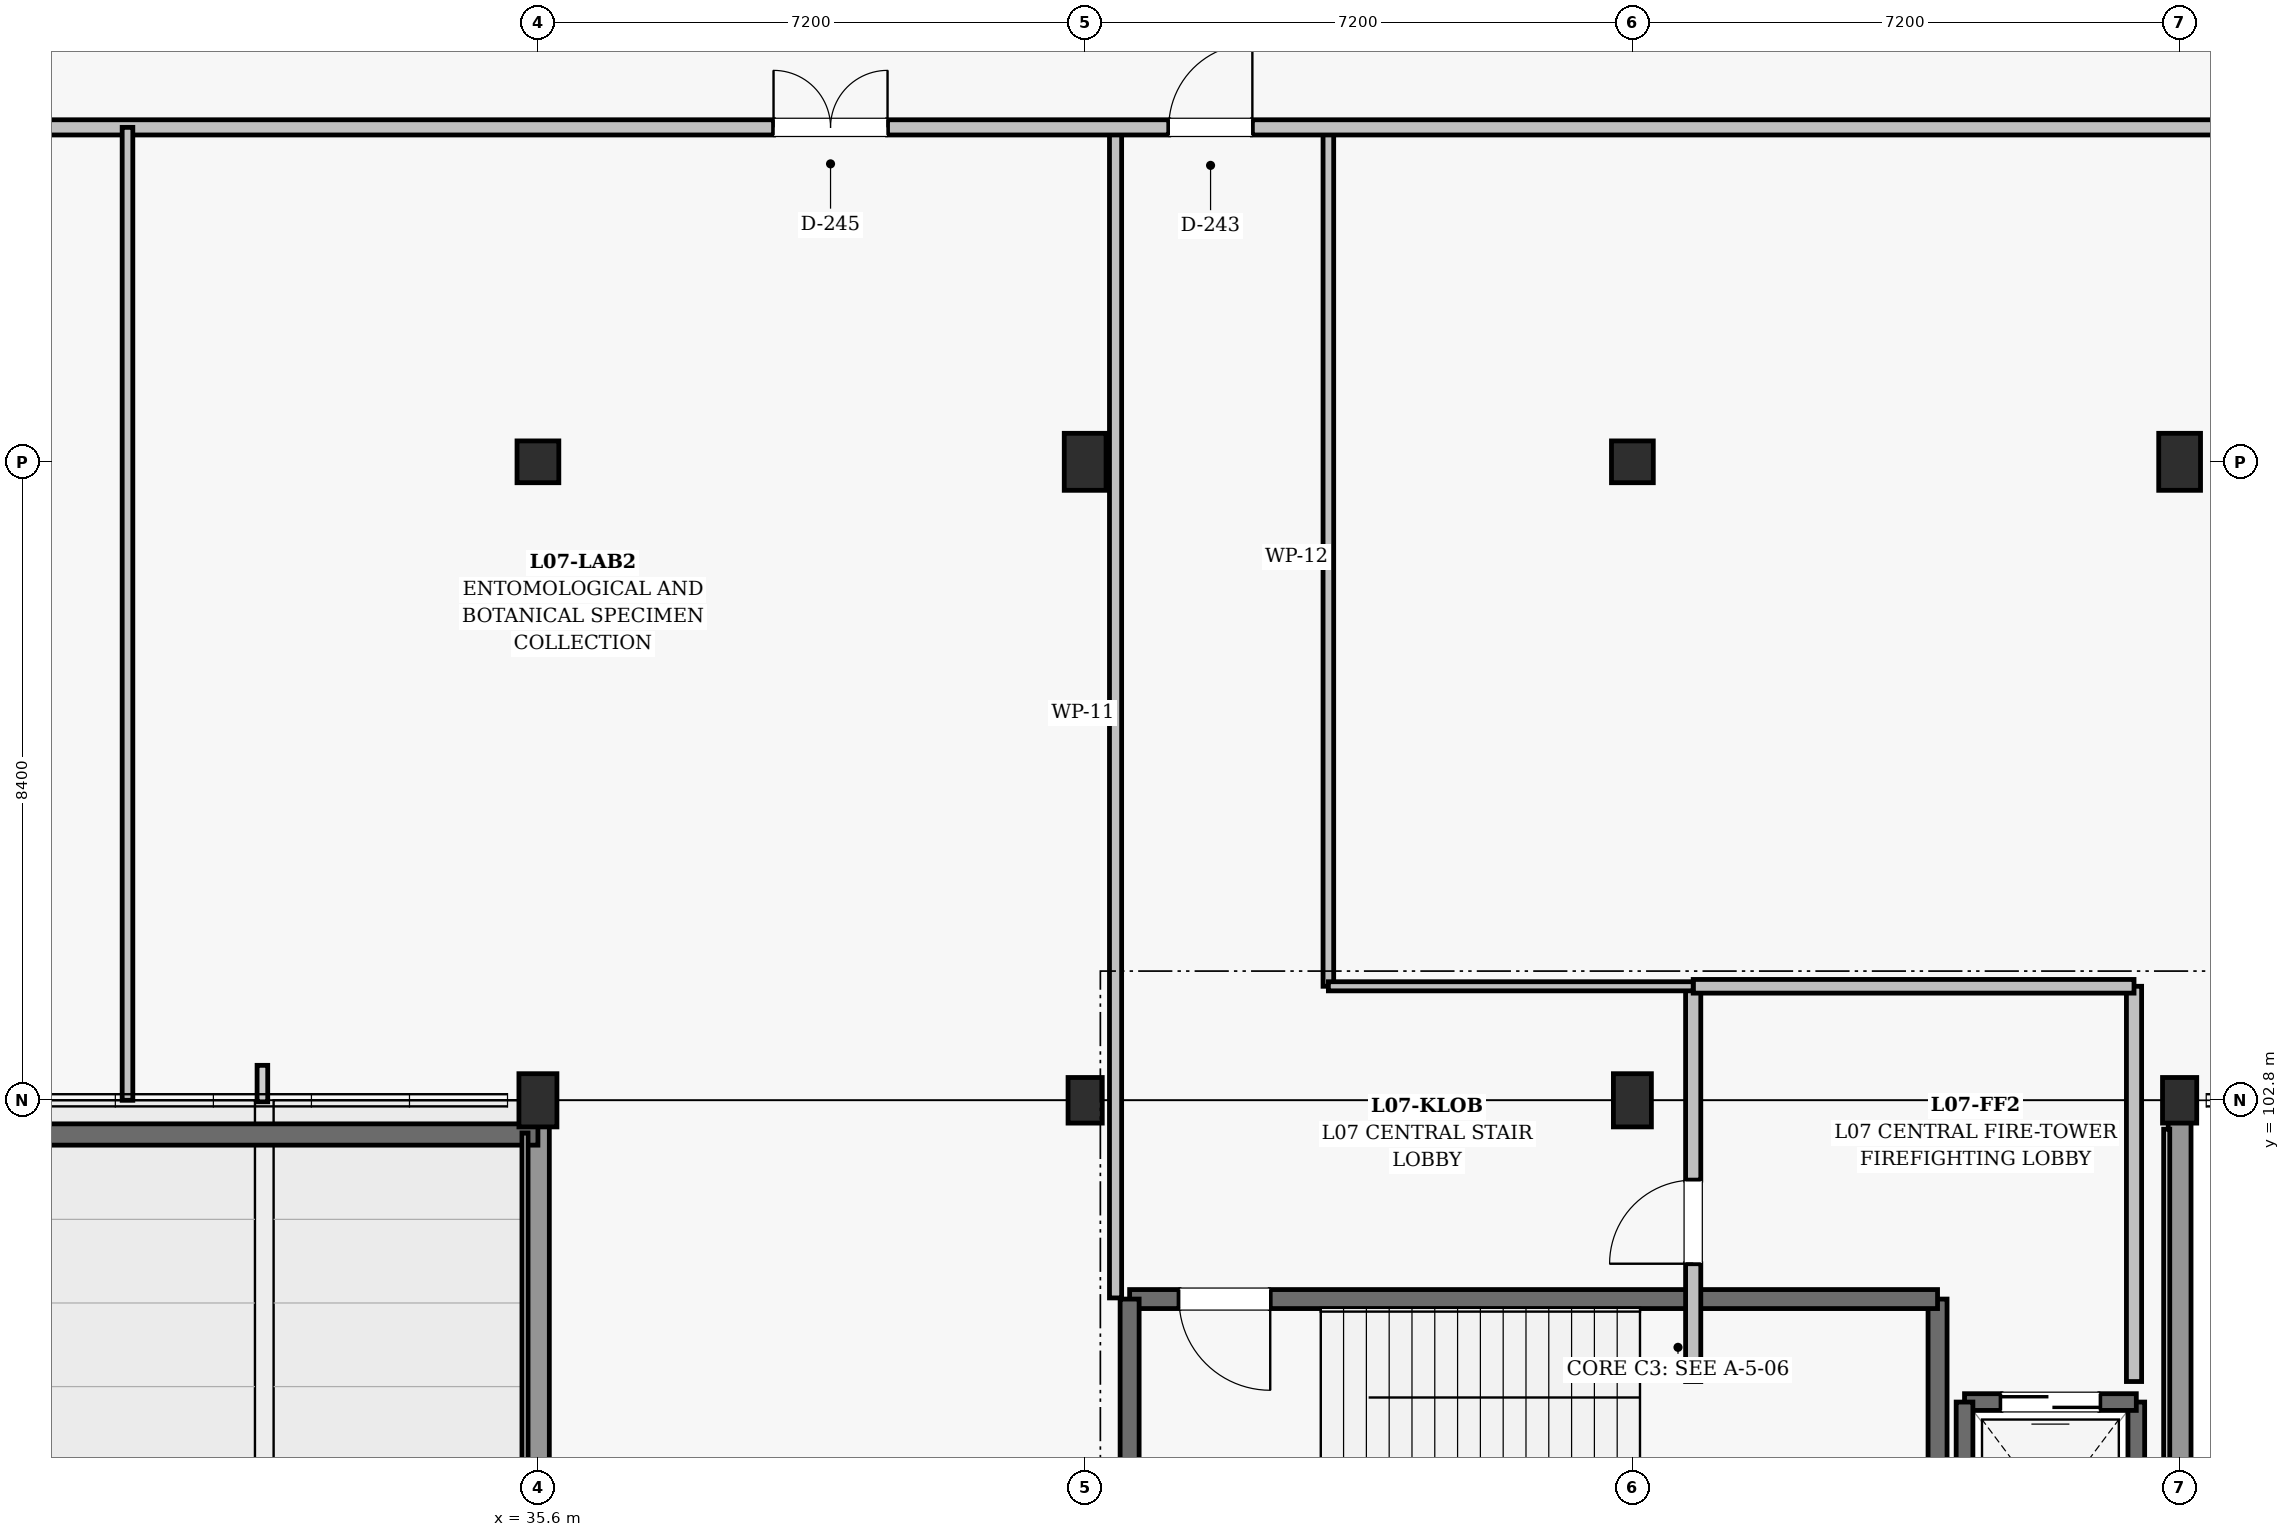
"""IFC4 building model, lengths in metres.
Left out: names, types, materials, properties, quantities, classifications, styles, units other than length and angle.
Written with IfcOpenShell. Run it as: python <this file> out.ifc"""

import sys

from ifc_helpers import new_model, si_unit, direction, frame, frame_2d, origin, origin_2d, place, context, subcontext, project, spatial, polyline, rectangle, outline, extrude, element, fill, save


model = new_model("IFC4")
c1 = context("Model", 3, precision=1e-05, world=origin(), true_north=direction((0.0, 1.0)))
c2 = subcontext(c1, "Body", "Model", "MODEL_VIEW")
j1 = project(units=[si_unit("LENGTHUNIT", "METRE"), si_unit("PLANEANGLEUNIT", "RADIAN")], contexts=[c1])
p1 = place(None, origin())
s1 = spatial("IfcSite", under=j1, at=p1, CompositionType="ELEMENT")
p2 = place(p1, origin())
s2 = spatial("IfcBuilding", under=s1, at=p2, CompositionType="ELEMENT")
p3 = place(p2, frame((0.0, 0.0, 32.4)))
s3 = spatial("IfcBuildingStorey", under=s2, at=p3, CompositionType="ELEMENT", Elevation=32.4)
p4 = place(p3, frame((35.6, 102.8, 0.0), z_axis=(0.0, 0.0, 1.0), x_axis=(1.0, 0.0, 0.0)))
e1 = element("IfcColumn", 1, at=p4, inside=s3, PredefinedType="COLUMN", context=c2, shape_type="SweptSolid", body=[
    extrude(rectangle(XDim=0.5, YDim=0.7, at=origin_2d()), origin(), (0.0, 0.0, 1.0), 4.5),
])
p5 = place(p3, frame((35.6, 111.2, 0.0), z_axis=(0.0, 0.0, 1.0), x_axis=(1.0, 0.0, 0.0)))
e2 = element("IfcColumn", 2, at=p5, inside=s3, PredefinedType="COLUMN", context=c2, shape_type="SweptSolid", body=[
    extrude(rectangle(XDim=0.55, YDim=0.55, at=origin_2d()), origin(), (0.0, 0.0, 1.0), 4.5),
])
p6 = place(p3, frame((42.8, 102.8, 0.0), z_axis=(0.0, 0.0, 1.0), x_axis=(1.0, 0.0, 0.0)))
e3 = element("IfcColumn", 3, at=p6, inside=s3, PredefinedType="COLUMN", context=c2, shape_type="SweptSolid", body=[
    extrude(rectangle(XDim=0.45, YDim=0.6, at=origin_2d()), origin(), (0.0, 0.0, 1.0), 4.5),
])
p7 = place(p3, frame((42.8, 111.2, 0.0), z_axis=(0.0, 0.0, 1.0), x_axis=(1.0, 0.0, 0.0)))
e4 = element("IfcColumn", 4, at=p7, inside=s3, PredefinedType="COLUMN", context=c2, shape_type="SweptSolid", body=[
    extrude(rectangle(XDim=0.55, YDim=0.75, at=origin_2d()), origin(), (0.0, 0.0, 1.0), 4.5),
])
p8 = place(p3, frame((50.0, 102.8, 0.0), z_axis=(0.0, 0.0, 1.0), x_axis=(1.0, 0.0, 0.0)))
e5 = element("IfcColumn", 5, at=p8, inside=s3, PredefinedType="COLUMN", context=c2, shape_type="SweptSolid", body=[
    extrude(rectangle(XDim=0.5, YDim=0.7, at=origin_2d()), origin(), (0.0, 0.0, 1.0), 4.5),
])
p9 = place(p3, frame((50.0, 111.2, 0.0), z_axis=(0.0, 0.0, 1.0), x_axis=(1.0, 0.0, 0.0)))
e6 = element("IfcColumn", 6, at=p9, inside=s3, PredefinedType="COLUMN", context=c2, shape_type="SweptSolid", body=[
    extrude(rectangle(XDim=0.55, YDim=0.55, at=origin_2d()), origin(), (0.0, 0.0, 1.0), 4.5),
])
p10 = place(p3, frame((57.2, 102.8, 0.0), z_axis=(0.0, 0.0, 1.0), x_axis=(1.0, 0.0, 0.0)))
e7 = element("IfcColumn", 7, at=p10, inside=s3, PredefinedType="COLUMN", context=c2, shape_type="SweptSolid", body=[
    extrude(rectangle(XDim=0.45, YDim=0.6, at=origin_2d()), origin(), (0.0, 0.0, 1.0), 4.5),
])
p11 = place(p3, frame((57.2, 111.2, 0.0), z_axis=(0.0, 0.0, 1.0), x_axis=(1.0, 0.0, 0.0)))
e8 = element("IfcColumn", 8, at=p11, inside=s3, PredefinedType="COLUMN", context=c2, shape_type="SweptSolid", body=[
    extrude(rectangle(XDim=0.55, YDim=0.75, at=origin_2d()), origin(), (0.0, 0.0, 1.0), 4.5),
])
p12 = place(p3, frame((57.2, 94.655, 0.0), z_axis=(0.0, 0.0, 1.0), x_axis=(0.0, 1.0, 0.0)))
e9 = element("IfcWall", 9, at=p12, inside=s3, PredefinedType="SOLIDWALL", context=c2, shape_type="SweptSolid", body=[
    extrude(rectangle(XDim=7.865, YDim=0.3, at=frame_2d((3.933, 0.0))), origin(), (0.0, 0.0, 1.0), 3.355),
])
p13 = place(p3, frame((35.6, 94.68, 0.0), z_axis=(0.0, 0.0, 1.0), x_axis=(0.0, 1.0, 0.0)))
e10 = element("IfcWall", 10, at=p13, inside=s3, PredefinedType="SOLIDWALL", context=c2, shape_type="SweptSolid", body=[
    extrude(rectangle(XDim=7.79, YDim=0.3, at=frame_2d((3.895, 0.0))), origin(), (0.0, 0.0, 1.0), 2.955),
])
p14 = place(p3, frame((28.4, 102.35, 0.0), z_axis=(0.0, 0.0, 1.0), x_axis=(1.0, 0.0, 0.0)))
e11 = element("IfcWall", 11, at=p14, inside=s3, PredefinedType="SOLIDWALL", context=c2, shape_type="SweptSolid", body=[
    extrude(outline(polyline([(0.0, 0.0), (7.2, 0.0), (7.2, 0.15), (3.6, 2.78), (0.0, 0.15), (0.0, 0.0)])), frame((0.0, 0.14, 0.0), z_axis=(0.0, -1.0, 0.0), x_axis=(1.0, 0.0, 0.0)), (0.0, 0.0, 1.0), 0.28),
])
p15 = place(p3, frame((54.015, 95.085, 0.0), z_axis=(0.0, 0.0, 1.0), x_axis=(0.0, 1.0, 0.0)))
e12 = element("IfcWall", 12, at=p15, inside=s3, PredefinedType="SHEAR", context=c2, shape_type="SweptSolid", body=[
    extrude(rectangle(XDim=5.1, YDim=0.25, at=frame_2d((2.55, 0.0))), origin(), (0.0, 0.0, 1.0), 4.175),
])
p16 = place(p3, frame((54.015, 100.185, 0.0), z_axis=(0.0, 0.0, 1.0), x_axis=(-1.0, 0.0, 0.0)))
e13 = element("IfcWall", 13, at=p16, inside=s3, PredefinedType="SHEAR", context=c2, shape_type="SweptSolid", body=[
    extrude(rectangle(XDim=10.63, YDim=0.25, at=frame_2d((5.315, 0.0))), origin(), (0.0, 0.0, 1.0), 4.175),
])
p17 = place(p16, frame((8.78, 0.0, 0.0)))
e14 = element("IfcOpeningElement", 14, at=p17, cuts=e13, PredefinedType="OPENING", context=c2, shape_type="SweptSolid", body=[
    extrude(rectangle(XDim=1.2, YDim=2.15, at=frame_2d((0.6, 1.075))), frame((0.0, 0.135, 0.0), z_axis=(0.0, -1.0, 0.0), x_axis=(1.0, 0.0, 0.0)), (0.0, 0.0, 1.0), 0.27),
])
p18 = place(p3, frame((43.385, 100.185, 0.0), z_axis=(0.0, 0.0, 1.0), x_axis=(0.0, -1.0, 0.0)))
e15 = element("IfcWall", 15, at=p18, inside=s3, PredefinedType="SHEAR", context=c2, shape_type="SweptSolid", body=[
    extrude(rectangle(XDim=5.1, YDim=0.25, at=frame_2d((2.55, 0.0))), origin(), (0.0, 0.0, 1.0), 4.175),
])
p19 = place(p3, frame((56.63, 95.97, 0.0), z_axis=(0.0, 0.0, 1.0), x_axis=(0.0, 1.0, 0.0)))
e16 = element("IfcWall", 16, at=p19, inside=s3, PredefinedType="SHEAR", context=c2, shape_type="SweptSolid", body=[
    extrude(rectangle(XDim=2.86, YDim=0.22, at=frame_2d((1.43, 0.0))), origin(), (0.0, 0.0, 1.0), 4.175),
])
p20 = place(p3, frame((56.63, 98.83, 0.0), z_axis=(0.0, 0.0, 1.0), x_axis=(-1.0, 0.0, 0.0)))
e17 = element("IfcWall", 17, at=p20, inside=s3, PredefinedType="SHEAR", context=c2, shape_type="SweptSolid", body=[
    extrude(rectangle(XDim=2.26, YDim=0.22, at=frame_2d((1.13, 0.0))), origin(), (0.0, 0.0, 1.0), 4.175),
])
p21 = place(p20, frame((0.48, 0.0, 0.0)))
e18 = element("IfcOpeningElement", 18, at=p21, cuts=e17, PredefinedType="OPENING", context=c2, shape_type="SweptSolid", body=[
    extrude(rectangle(XDim=1.3, YDim=2.2, at=frame_2d((0.65, 1.1))), frame((0.0, 0.12, 0.0), z_axis=(0.0, -1.0, 0.0), x_axis=(1.0, 0.0, 0.0)), (0.0, 0.0, 1.0), 0.24),
])
p22 = place(p3, frame((54.37, 98.83, 0.0), z_axis=(0.0, 0.0, 1.0), x_axis=(0.0, -1.0, 0.0)))
e19 = element("IfcWall", 19, at=p22, inside=s3, PredefinedType="SHEAR", context=c2, shape_type="SweptSolid", body=[
    extrude(rectangle(XDim=2.86, YDim=0.22, at=frame_2d((1.43, 0.0))), origin(), (0.0, 0.0, 1.0), 4.175),
])
p23 = place(p3, frame((50.8, 99.1, 0.0), z_axis=(0.0, 0.0, 1.0), x_axis=(0.0, 1.0, 0.0)))
e20 = element("IfcWall", 20, at=p23, inside=s3, PredefinedType="SOLIDWALL", context=c2, shape_type="SweptSolid", body=[
    extrude(rectangle(XDim=5.2, YDim=0.2, at=frame_2d((2.6, 0.0))), origin(), (0.0, 0.0, 1.0), 3.36),
])
p24 = place(p23, frame((1.55, 0.0, 0.0)))
e21 = element("IfcOpeningElement", 21, at=p24, cuts=e20, PredefinedType="OPENING", context=c2, shape_type="SweptSolid", body=[
    extrude(rectangle(XDim=1.1, YDim=2.15, at=frame_2d((0.55, 1.075))), frame((0.0, 0.11, 0.0), z_axis=(0.0, -1.0, 0.0), x_axis=(1.0, 0.0, 0.0)), (0.0, 0.0, 1.0), 0.22),
])
p25 = place(p3, frame((56.6, 99.1, 0.0), z_axis=(0.0, 0.0, 1.0), x_axis=(0.0, 1.0, 0.0)))
e22 = element("IfcWall", 22, at=p25, inside=s3, PredefinedType="SOLIDWALL", context=c2, shape_type="SweptSolid", body=[
    extrude(rectangle(XDim=5.2, YDim=0.2, at=frame_2d((2.6, 0.0))), origin(), (0.0, 0.0, 1.0), 3.36),
])
p26 = place(p3, frame((50.8, 104.3, 0.0), z_axis=(0.0, 0.0, 1.0), x_axis=(1.0, 0.0, 0.0)))
e23 = element("IfcWall", 23, at=p26, inside=s3, PredefinedType="SOLIDWALL", context=c2, shape_type="SweptSolid", body=[
    extrude(rectangle(XDim=5.8, YDim=0.18, at=frame_2d((2.9, 0.0))), origin(), (0.0, 0.0, 1.0), 3.56),
])
p27 = place(p3, frame((43.2, 100.2, 0.0), z_axis=(0.0, 0.0, 1.0), x_axis=(0.0, 1.0, 0.0)))
e24 = element("IfcWall", 24, at=p27, inside=s3, PredefinedType="PARTITIONING", context=c2, shape_type="SweptSolid", body=[
    extrude(rectangle(XDim=15.4, YDim=0.16, at=frame_2d((7.7, 0.0))), origin(), (0.0, 0.0, 1.0), 2.96),
])
p28 = place(p3, frame((46.0, 104.3, 0.0), z_axis=(0.0, 0.0, 1.0), x_axis=(0.0, 1.0, 0.0)))
e25 = element("IfcWall", 25, at=p28, inside=s3, PredefinedType="PARTITIONING", context=c2, shape_type="SweptSolid", body=[
    extrude(rectangle(XDim=11.3, YDim=0.14, at=frame_2d((5.65, 0.0))), origin(), (0.0, 0.0, 1.0), 3.52),
])
p29 = place(p3, frame((46.0, 104.3, 0.0), z_axis=(0.0, 0.0, 1.0), x_axis=(1.0, 0.0, 0.0)))
e26 = element("IfcWall", 26, at=p29, inside=s3, PredefinedType="PARTITIONING", context=c2, shape_type="SweptSolid", body=[
    extrude(rectangle(XDim=4.8, YDim=0.12, at=frame_2d((2.4, 0.0))), origin(), (0.0, 0.0, 1.0), 3.31),
])
p30 = place(p3, frame((14.0, 115.6, 0.0), z_axis=(0.0, 0.0, 1.0), x_axis=(1.0, 0.0, 0.0)))
e27 = element("IfcWall", 27, at=p30, inside=s3, PredefinedType="SOLIDWALL", context=c2, shape_type="SweptSolid", body=[
    extrude(rectangle(XDim=86.4, YDim=0.2, at=frame_2d((43.2, 0.0))), origin(), (0.0, 0.0, 1.0), 2.96),
])
p31 = place(p30, frame((29.9, 0.0, 0.0)))
e28 = element("IfcOpeningElement", 28, at=p31, cuts=e27, PredefinedType="OPENING", context=c2, shape_type="SweptSolid", body=[
    extrude(rectangle(XDim=1.1, YDim=2.15, at=frame_2d((0.55, 1.075))), frame((0.0, 0.11, 0.0), z_axis=(0.0, -1.0, 0.0), x_axis=(1.0, 0.0, 0.0)), (0.0, 0.0, 1.0), 0.22),
])
p32 = place(p30, frame((8.3, 0.0, 0.0)))
e29 = element("IfcOpeningElement", 29, at=p32, cuts=e27, PredefinedType="OPENING", context=c2, shape_type="SweptSolid", body=[
    extrude(rectangle(XDim=1.5, YDim=2.2, at=frame_2d((0.75, 1.1))), frame((0.0, 0.11, 0.0), z_axis=(0.0, -1.0, 0.0), x_axis=(1.0, 0.0, 0.0)), (0.0, 0.0, 1.0), 0.22),
])
p33 = place(p30, frame((24.7, 0.0, 0.0)))
e30 = element("IfcOpeningElement", 30, at=p33, cuts=e27, PredefinedType="OPENING", context=c2, shape_type="SweptSolid", body=[
    extrude(rectangle(XDim=1.5, YDim=2.2, at=frame_2d((0.75, 1.1))), frame((0.0, 0.11, 0.0), z_axis=(0.0, -1.0, 0.0), x_axis=(1.0, 0.0, 0.0)), (0.0, 0.0, 1.0), 0.22),
])
p34 = place(p30, frame((45.0, 0.0, 0.0)))
e31 = element("IfcOpeningElement", 31, at=p34, cuts=e27, PredefinedType="OPENING", context=c2, shape_type="SweptSolid", body=[
    extrude(rectangle(XDim=1.5, YDim=2.2, at=frame_2d((0.75, 1.1))), frame((0.0, 0.11, 0.0), z_axis=(0.0, -1.0, 0.0), x_axis=(1.0, 0.0, 0.0)), (0.0, 0.0, 1.0), 0.22),
])
p35 = place(p30, frame((62.1, 0.0, 0.0)))
e32 = element("IfcOpeningElement", 32, at=p35, cuts=e27, PredefinedType="OPENING", context=c2, shape_type="SweptSolid", body=[
    extrude(rectangle(XDim=1.5, YDim=2.2, at=frame_2d((0.75, 1.1))), frame((0.0, 0.11, 0.0), z_axis=(0.0, -1.0, 0.0), x_axis=(1.0, 0.0, 0.0)), (0.0, 0.0, 1.0), 0.22),
])
p36 = place(p30, frame((80.1, 0.0, 0.0)))
e33 = element("IfcOpeningElement", 33, at=p36, cuts=e27, PredefinedType="OPENING", context=c2, shape_type="SweptSolid", body=[
    extrude(rectangle(XDim=1.1, YDim=2.15, at=frame_2d((0.55, 1.075))), frame((0.0, 0.11, 0.0), z_axis=(0.0, -1.0, 0.0), x_axis=(1.0, 0.0, 0.0)), (0.0, 0.0, 1.0), 0.22),
])
p37 = place(p3, frame((30.2, 102.8, 0.0), z_axis=(0.0, 0.0, 1.0), x_axis=(0.0, 1.0, 0.0)))
e34 = element("IfcWall", 34, at=p37, inside=s3, PredefinedType="PARTITIONING", context=c2, shape_type="SweptSolid", body=[
    extrude(rectangle(XDim=12.8, YDim=0.14, at=frame_2d((6.4, 0.0))), origin(), (0.0, 0.0, 1.0), 3.41),
])
p38 = place(p17, origin())
e35 = element("IfcDoor", 35, at=p38, inside=s3, OperationType="SINGLE_SWING_LEFT", PredefinedType="DOOR", context=c2, shape_type="SweptSolid", body=[
    extrude(rectangle(XDim=1.2, YDim=2.15, at=frame_2d((0.6, 1.075))), frame((0.0, 0.025, 0.0), z_axis=(0.0, -1.0, 0.0), x_axis=(1.0, 0.0, 0.0)), (0.0, 0.0, 1.0), 0.05),
])
fill(e14, e35)
p39 = place(p21, origin())
e36 = element("IfcDoor", 36, at=p39, inside=s3, OperationType="DOUBLE_DOOR_SLIDING", PredefinedType="DOOR", context=c2, shape_type="SweptSolid", body=[
    extrude(rectangle(XDim=1.3, YDim=2.2, at=frame_2d((0.65, 1.1))), frame((0.0, 0.025, 0.0), z_axis=(0.0, -1.0, 0.0), x_axis=(1.0, 0.0, 0.0)), (0.0, 0.0, 1.0), 0.05),
])
fill(e18, e36)
p40 = place(p24, origin())
e37 = element("IfcDoor", 37, at=p40, inside=s3, OperationType="SINGLE_SWING_LEFT", PredefinedType="DOOR", context=c2, shape_type="SweptSolid", body=[
    extrude(rectangle(XDim=1.1, YDim=2.15, at=frame_2d((0.55, 1.075))), frame((0.0, 0.025, 0.0), z_axis=(0.0, -1.0, 0.0), x_axis=(1.0, 0.0, 0.0)), (0.0, 0.0, 1.0), 0.05),
])
fill(e21, e37)
p41 = place(p31, origin())
e38 = element("IfcDoor", 38, at=p41, inside=s3, OperationType="SINGLE_SWING_RIGHT", PredefinedType="DOOR", context=c2, shape_type="SweptSolid", body=[
    extrude(rectangle(XDim=1.1, YDim=2.15, at=frame_2d((0.55, 1.075))), frame((0.0, 0.025, 0.0), z_axis=(0.0, -1.0, 0.0), x_axis=(1.0, 0.0, 0.0)), (0.0, 0.0, 1.0), 0.05),
])
fill(e28, e38)
p42 = place(p33, origin())
e39 = element("IfcDoor", 39, at=p42, inside=s3, OperationType="DOUBLE_DOOR_SINGLE_SWING", PredefinedType="DOOR", context=c2, shape_type="SweptSolid", body=[
    extrude(rectangle(XDim=1.5, YDim=2.2, at=frame_2d((0.75, 1.1))), frame((0.0, 0.025, 0.0), z_axis=(0.0, -1.0, 0.0), x_axis=(1.0, 0.0, 0.0)), (0.0, 0.0, 1.0), 0.05),
])
fill(e30, e39)
save(model, sys.argv[1])
